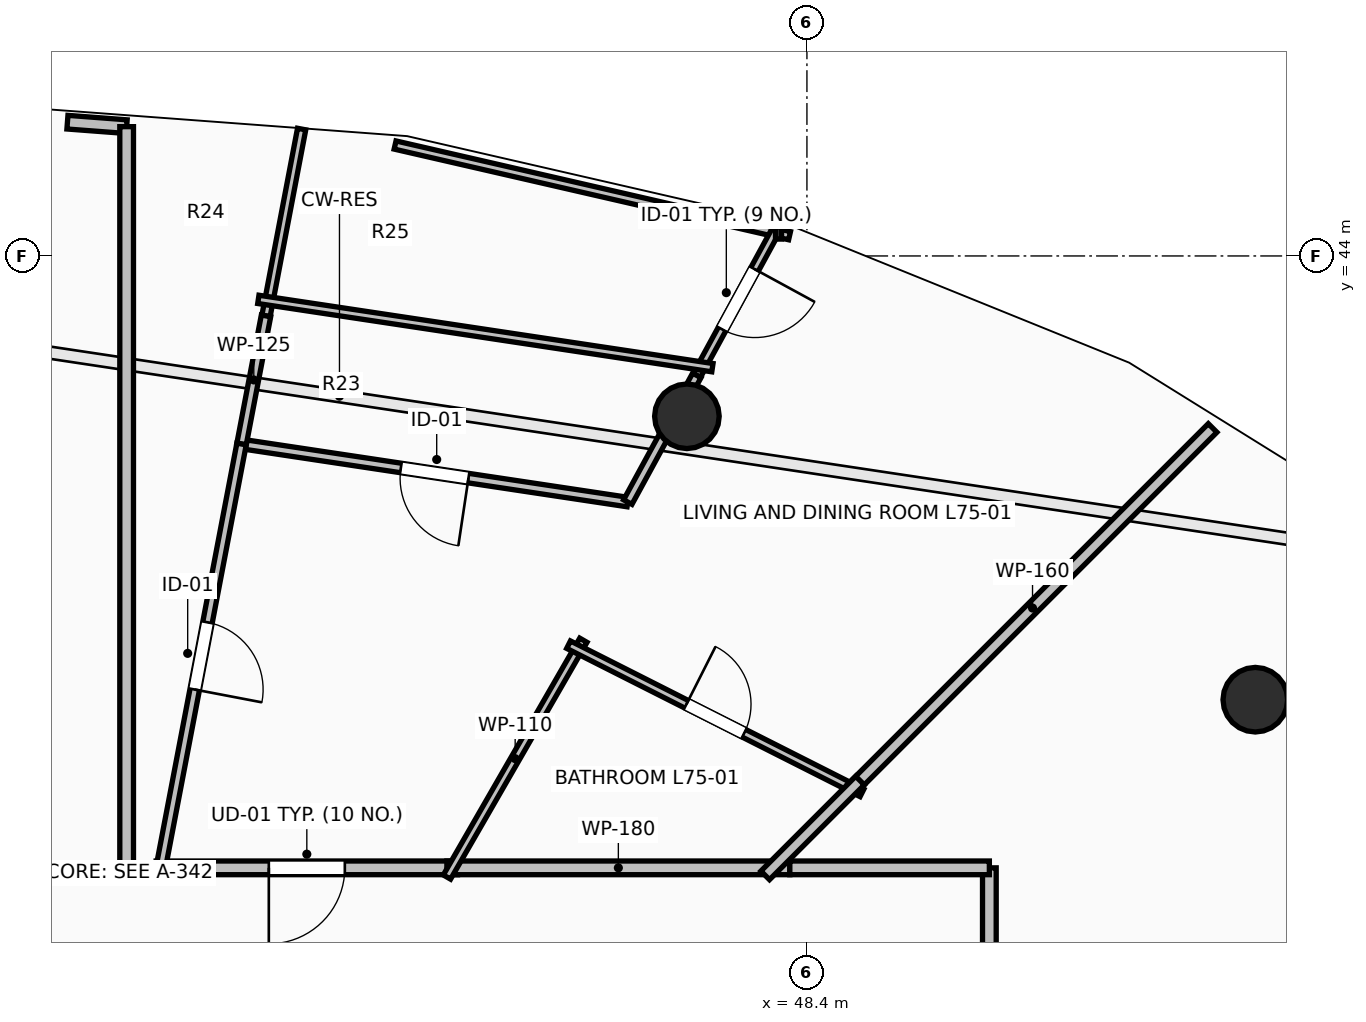
"""IFC4 building model, lengths in metres.
Left out: names, types, materials, properties, quantities, classifications, styles, units other than length and angle.
Written with IfcOpenShell. Run it as: python <this file> out.ifc"""

import sys

from ifc_helpers import new_model, si_unit, direction, frame, frame_2d, origin, origin_2d, place, context, subcontext, project, spatial, rectangle, circle, extrude, element, fill, save


model = new_model("IFC4")
c1 = context("Model", 3, precision=1e-05, world=origin(), true_north=direction((0.0, 1.0)))
c2 = subcontext(c1, "Body", "Model", "MODEL_VIEW")
j1 = project(units=[si_unit("LENGTHUNIT", "METRE"), si_unit("PLANEANGLEUNIT", "RADIAN")], contexts=[c1])
p1 = place(None, origin())
s1 = spatial("IfcSite", under=j1, at=p1, CompositionType="ELEMENT")
p2 = place(p1, origin())
s2 = spatial("IfcBuilding", under=s1, at=p2, CompositionType="ELEMENT")
p3 = place(p2, frame((0.0, 0.0, 276.85)))
s3 = spatial("IfcBuildingStorey", under=s2, at=p3, CompositionType="ELEMENT", Elevation=276.85)
for number, where, z_axis, x_axis in (
    (1, (54.299, 38.162, 0.0), (0.0, 0.0, 1.0), (0.707, 0.707, 0.0)),
    (2, (46.821, 41.891, 0.0), (0.0, 0.0, 1.0), (0.383, 0.924, 0.0)),
):
    element("IfcColumn", number, at=place(p3, frame(where, z_axis=z_axis, x_axis=x_axis)), inside=s3, PredefinedType="COLUMN", context=c2, shape_type="SweptSolid", body=[
        extrude(circle(Radius=0.425, at=origin_2d()), origin(), (0.0, 0.0, 1.0), 3.55),
    ])
p4 = place(p3, frame((43.803, 35.95, 0.0), z_axis=(0.0, 0.0, 1.0), x_axis=(-1.0, 0.0, 0.0)))
e3 = element("IfcWall", 3, at=p4, inside=s3, PredefinedType="PARTITIONING", context=c2, shape_type="SweptSolid", body=[
    extrude(rectangle(XDim=3.965, YDim=0.18, at=frame_2d((1.982, 0.0))), origin(), (0.0, 0.0, 1.0), 3.19),
])
p5 = place(p4, frame((1.482, 0.0, 0.0)))
e4 = element("IfcOpeningElement", 4, at=p5, cuts=e3, PredefinedType="OPENING", context=c2, shape_type="SweptSolid", body=[
    extrude(rectangle(XDim=1.0, YDim=2.15, at=frame_2d((0.5, 1.075))), frame((0.0, 0.105, 0.0), z_axis=(0.0, -1.0, 0.0), x_axis=(1.0, 0.0, 0.0)), (0.0, 0.0, 1.0), 0.21),
])
p6 = place(p3, frame((48.175, 35.95, 0.0), z_axis=(0.0, 0.0, 1.0), x_axis=(-1.0, 0.0, 0.0)))
e5 = element("IfcWall", 5, at=p6, inside=s3, PredefinedType="PARTITIONING", context=c2, shape_type="SweptSolid", body=[
    extrude(rectangle(XDim=4.512, YDim=0.18, at=frame_2d((2.256, 0.0))), origin(), (0.0, 0.0, 1.0), 2.382),
])
p7 = place(p3, frame((39.45, 45.701, 0.0), z_axis=(0.0, 0.0, 1.0), x_axis=(-0.997136622012, 0.0756211415, 0.0)))
e6 = element("IfcWall", 6, at=p7, inside=s3, PredefinedType="PARTITIONING", context=c2, shape_type="SweptSolid", body=[
    extrude(rectangle(XDim=0.781, YDim=0.18, at=frame_2d((0.391, 0.0))), origin(), (0.0, 0.0, 1.0), 3.19),
])
p8 = place(p3, frame((39.45, 35.95, 0.0), z_axis=(0.0, 0.0, 1.0), x_axis=(0.0, 1.0, 0.0)))
e7 = element("IfcWall", 7, at=p8, inside=s3, PredefinedType="PARTITIONING", context=c2, shape_type="SweptSolid", body=[
    extrude(rectangle(XDim=9.751, YDim=0.18, at=frame_2d((4.875, 0.0))), origin(), (0.0, 0.0, 1.0), 3.19),
])
p9 = place(p3, frame((50.8, 26.06, 0.0), z_axis=(0.0, 0.0, 1.0), x_axis=(0.0, 1.0, 0.0)))
e8 = element("IfcWall", 8, at=p9, inside=s3, PredefinedType="PARTITIONING", context=c2, shape_type="SweptSolid", body=[
    extrude(rectangle(XDim=9.89, YDim=0.18, at=frame_2d((4.945, 0.0))), origin(), (0.0, 0.0, 1.0), 2.382),
])
p10 = place(p9, frame((4.445, 0.0, 0.0)))
e9 = element("IfcOpeningElement", 9, at=p10, cuts=e8, PredefinedType="OPENING", context=c2, shape_type="SweptSolid", body=[
    extrude(rectangle(XDim=1.0, YDim=2.15, at=frame_2d((0.5, 1.075))), frame((0.0, 0.105, 0.0), z_axis=(0.0, -1.0, 0.0), x_axis=(1.0, 0.0, 0.0)), (0.0, 0.0, 1.0), 0.21),
])
p11 = place(p3, frame((50.8, 35.95, 0.0), z_axis=(0.0, 0.0, 1.0), x_axis=(-1.0, 0.0, 0.0)))
e10 = element("IfcWall", 10, at=p11, inside=s3, PredefinedType="PARTITIONING", context=c2, shape_type="SweptSolid", body=[
    extrude(rectangle(XDim=2.625, YDim=0.18, at=frame_2d((1.312, 0.0))), origin(), (0.0, 0.0, 1.0), 2.382),
])
p12 = place(p3, frame((43.664, 35.829, 0.0), z_axis=(0.0, 0.0, 1.0), x_axis=(0.49917767271, 0.866499654396, 0.0)))
e11 = element("IfcWall", 11, at=p12, inside=s3, PredefinedType="PARTITIONING", context=c2, shape_type="SweptSolid", body=[
    extrude(rectangle(XDim=3.596, YDim=0.11, at=frame_2d((1.798, 0.0))), origin(), (0.0, 0.0, 1.0), 3.19),
])
p13 = place(p3, frame((45.264, 38.886, 0.0), z_axis=(0.0, 0.0, 1.0), x_axis=(0.892556527512, -0.450935522216, 0.0)))
e12 = element("IfcWall", 12, at=p13, inside=s3, PredefinedType="PARTITIONING", context=c2, shape_type="SweptSolid", body=[
    extrude(rectangle(XDim=4.325, YDim=0.11, at=frame_2d((2.162, 0.0))), origin(), (0.0, 0.0, 1.0), 2.382),
])
p14 = place(p13, frame((1.737, 0.0, 0.0)))
e13 = element("IfcOpeningElement", 13, at=p14, cuts=e12, PredefinedType="OPENING", context=c2, shape_type="SweptSolid", body=[
    extrude(rectangle(XDim=0.85, YDim=2.1, at=frame_2d((0.425, 1.05))), frame((0.0, 0.07, 0.0), z_axis=(0.0, -1.0, 0.0), x_axis=(1.0, 0.0, 0.0)), (0.0, 0.0, 1.0), 0.14),
])
p15 = place(p3, frame((41.284, 43.211, 0.0), z_axis=(0.0, 0.0, 1.0), x_axis=(0.187233159216, 0.982315501298, 0.0)))
e14 = element("IfcWall", 14, at=p15, inside=s3, PredefinedType="PARTITIONING", context=c2, shape_type="SweptSolid", body=[
    extrude(rectangle(XDim=2.502, YDim=0.11, at=frame_2d((1.251, 0.0))), origin(), (0.0, 0.0, 1.0), 3.19),
])
p16 = place(p3, frame((48.171, 44.267, 0.0), z_axis=(0.0, 0.0, 1.0), x_axis=(-0.974586324437, 0.224012268015, 0.0)))
e15 = element("IfcWall", 15, at=p16, inside=s3, PredefinedType="PARTITIONING", context=c2, shape_type="SweptSolid", body=[
    extrude(rectangle(XDim=5.325, YDim=0.11, at=frame_2d((2.663, 0.0))), origin(), (0.0, 0.0, 1.0), 3.19),
])
p17 = place(p3, frame((48.044, 44.434, 0.0), z_axis=(0.0, 0.0, 1.0), x_axis=(-0.478485169604, -0.878095634011, 0.0)))
e16 = element("IfcWall", 16, at=p17, inside=s3, PredefinedType="PARTITIONING", context=c2, shape_type="SweptSolid", body=[
    extrude(rectangle(XDim=2.284, YDim=0.11, at=frame_2d((1.142, 0.0))), origin(), (0.0, 0.0, 1.0), 3.19),
])
p18 = place(p17, frame((0.692, 0.0, 0.0)))
e17 = element("IfcOpeningElement", 17, at=p18, cuts=e16, PredefinedType="OPENING", context=c2, shape_type="SweptSolid", body=[
    extrude(rectangle(XDim=0.9, YDim=2.1, at=frame_2d((0.45, 1.05))), frame((0.0, 0.07, 0.0), z_axis=(0.0, -1.0, 0.0), x_axis=(1.0, 0.0, 0.0)), (0.0, 0.0, 1.0), 0.14),
])
p19 = place(p3, frame((46.043, 40.762, 0.0), z_axis=(0.0, 0.0, 1.0), x_axis=(-0.988886109078, 0.148675025721, 0.0)))
e18 = element("IfcWall", 18, at=p19, inside=s3, PredefinedType="PARTITIONING", context=c2, shape_type="SweptSolid", body=[
    extrude(rectangle(XDim=5.138, YDim=0.125, at=frame_2d((2.569, 0.0))), origin(), (0.0, 0.0, 1.0), 3.19),
])
p20 = place(p19, frame((2.119, 0.0, 0.0)))
e19 = element("IfcOpeningElement", 19, at=p20, cuts=e18, PredefinedType="OPENING", context=c2, shape_type="SweptSolid", body=[
    extrude(rectangle(XDim=0.9, YDim=2.1, at=frame_2d((0.45, 1.05))), frame((0.0, 0.077, 0.0), z_axis=(0.0, -1.0, 0.0), x_axis=(1.0, 0.0, 0.0)), (0.0, 0.0, 1.0), 0.155),
])
p21 = place(p3, frame((40.962, 41.526, 0.0), z_axis=(0.0, 0.0, 1.0), x_axis=(0.187353972187, 0.982292466176, 0.0)))
e20 = element("IfcWall", 20, at=p21, inside=s3, PredefinedType="PARTITIONING", context=c2, shape_type="SweptSolid", body=[
    extrude(rectangle(XDim=1.716, YDim=0.125, at=frame_2d((0.858, 0.0))), origin(), (0.0, 0.0, 1.0), 3.19),
])
p22 = place(p3, frame((46.951, 42.428, 0.0), z_axis=(0.0, 0.0, 1.0), x_axis=(-0.478536562944, -0.878067627194, 0.0)))
e21 = element("IfcWall", 21, at=p22, inside=s3, PredefinedType="PARTITIONING", context=c2, shape_type="SweptSolid", body=[
    extrude(rectangle(XDim=1.897, YDim=0.125, at=frame_2d((0.949, 0.0))), origin(), (0.0, 0.0, 1.0), 3.19),
])
p23 = place(p3, frame((40.962, 41.526, 0.0), z_axis=(0.0, 0.0, 1.0), x_axis=(-0.18743226397, -0.982277530244, 0.0)))
e22 = element("IfcWall", 22, at=p23, inside=s3, PredefinedType="PARTITIONING", context=c2, shape_type="SweptSolid", body=[
    extrude(rectangle(XDim=5.677, YDim=0.125, at=frame_2d((2.838, 0.0))), origin(), (0.0, 0.0, 1.0), 3.19),
])
p24 = place(p23, frame((2.388, 0.0, 0.0)))
e23 = element("IfcOpeningElement", 23, at=p24, cuts=e22, PredefinedType="OPENING", context=c2, shape_type="SweptSolid", body=[
    extrude(rectangle(XDim=0.9, YDim=2.1, at=frame_2d((0.45, 1.05))), frame((0.0, 0.077, 0.0), z_axis=(0.0, -1.0, 0.0), x_axis=(1.0, 0.0, 0.0)), (0.0, 0.0, 1.0), 0.155),
])
p25 = place(p3, frame((48.999, 36.999, 0.0), z_axis=(0.0, 0.0, 1.0), x_axis=(0.707106781187, 0.707106781187, 0.0)))
e24 = element("IfcWall", 24, at=p25, inside=s3, PredefinedType="PARTITIONING", context=c2, shape_type="SweptSolid", body=[
    extrude(rectangle(XDim=6.701, YDim=0.16, at=frame_2d((3.35, 0.0))), origin(), (0.0, 0.0, 1.0), 2.774),
])
p26 = place(p3, frame((47.851, 35.851, 0.0), z_axis=(0.0, 0.0, 1.0), x_axis=(0.707106781187, 0.707106781187, 0.0)))
e25 = element("IfcWall", 25, at=p26, inside=s3, PredefinedType="PARTITIONING", context=c2, shape_type="SweptSolid", body=[
    extrude(rectangle(XDim=1.763, YDim=0.16, at=frame_2d((0.882, 0.0))), origin(), (0.0, 0.0, 1.0), 2.382),
])
p27 = place(p3, frame((41.183, 43.429, 0.0), z_axis=(0.0, 0.0, 1.0), x_axis=(0.988879067965, -0.148721850918, 0.0)))
e26 = element("IfcWall", 26, at=p27, inside=s3, PredefinedType="PARTITIONING", context=c2, shape_type="SweptSolid", body=[
    extrude(rectangle(XDim=6.041, YDim=0.11, at=frame_2d((3.021, 0.0))), origin(), (0.0, 0.0, 1.0), 3.19),
])
p28 = place(p5, origin())
e27 = element("IfcDoor", 27, at=p28, inside=s3, OperationType="SINGLE_SWING_RIGHT", PredefinedType="DOOR", context=c2, shape_type="SweptSolid", body=[
    extrude(rectangle(XDim=1.0, YDim=2.15, at=frame_2d((0.5, 1.075))), frame((0.0, 0.025, 0.0), z_axis=(0.0, -1.0, 0.0), x_axis=(1.0, 0.0, 0.0)), (0.0, 0.0, 1.0), 0.05),
])
fill(e4, e27)
p29 = place(p14, origin())
e28 = element("IfcDoor", 28, at=p29, inside=s3, OperationType="SINGLE_SWING_LEFT", PredefinedType="DOOR", context=c2, shape_type="SweptSolid", body=[
    extrude(rectangle(XDim=0.85, YDim=2.1, at=frame_2d((0.425, 1.05))), frame((0.0, 0.025, 0.0), z_axis=(0.0, -1.0, 0.0), x_axis=(1.0, 0.0, 0.0)), (0.0, 0.0, 1.0), 0.05),
])
fill(e13, e28)
p30 = place(p18, origin())
e29 = element("IfcDoor", 29, at=p30, inside=s3, OperationType="SINGLE_SWING_LEFT", PredefinedType="DOOR", context=c2, shape_type="SweptSolid", body=[
    extrude(rectangle(XDim=0.9, YDim=2.1, at=frame_2d((0.45, 1.05))), frame((0.0, 0.025, 0.0), z_axis=(0.0, -1.0, 0.0), x_axis=(1.0, 0.0, 0.0)), (0.0, 0.0, 1.0), 0.05),
])
fill(e17, e29)
p31 = place(p20, origin())
e30 = element("IfcDoor", 30, at=p31, inside=s3, OperationType="SINGLE_SWING_LEFT", PredefinedType="DOOR", context=c2, shape_type="SweptSolid", body=[
    extrude(rectangle(XDim=0.9, YDim=2.1, at=frame_2d((0.45, 1.05))), frame((0.0, 0.025, 0.0), z_axis=(0.0, -1.0, 0.0), x_axis=(1.0, 0.0, 0.0)), (0.0, 0.0, 1.0), 0.05),
])
fill(e19, e30)
p32 = place(p24, origin())
e31 = element("IfcDoor", 31, at=p32, inside=s3, OperationType="SINGLE_SWING_RIGHT", PredefinedType="DOOR", context=c2, shape_type="SweptSolid", body=[
    extrude(rectangle(XDim=0.9, YDim=2.1, at=frame_2d((0.45, 1.05))), frame((0.0, 0.025, 0.0), z_axis=(0.0, -1.0, 0.0), x_axis=(1.0, 0.0, 0.0)), (0.0, 0.0, 1.0), 0.05),
])
fill(e23, e31)
save(model, sys.argv[1])
